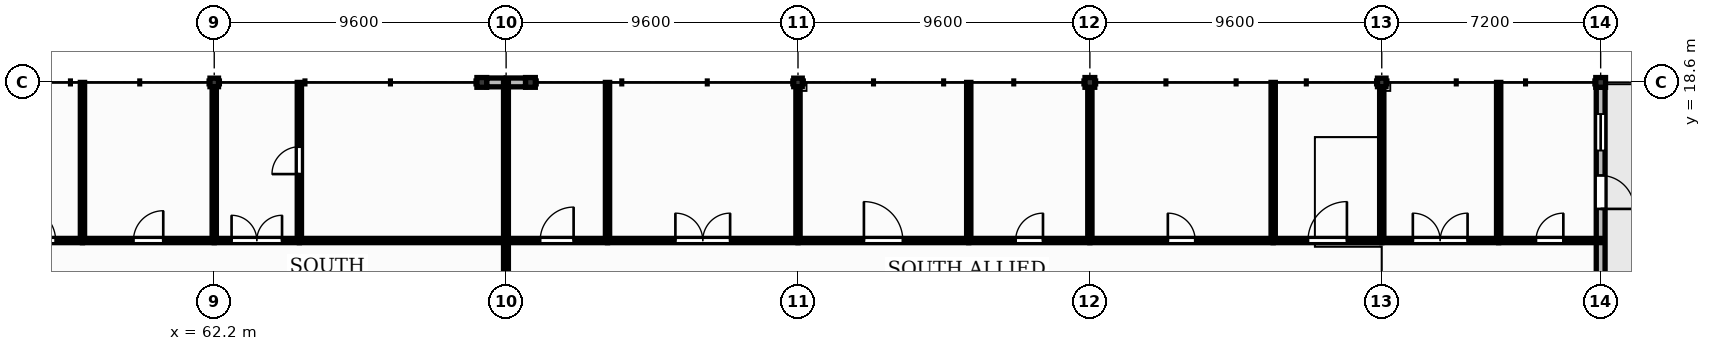
"""IFC4 building model, lengths in metres.
Left out: names, types, materials, properties, quantities, classifications, styles, units other than length and angle.
Written with IfcOpenShell. Run it as: python <this file> out.ifc"""

import sys

from ifc_helpers import new_model, si_unit, direction, frame, frame_2d, origin, origin_2d, place, context, subcontext, project, spatial, rectangle, extrude, element, fill, save


model = new_model("IFC4")
c1 = context("Model", 3, precision=1e-05, world=origin(), true_north=direction((0.0, 1.0)))
c2 = subcontext(c1, "Body", "Model", "MODEL_VIEW")
j1 = project(units=[si_unit("LENGTHUNIT", "METRE"), si_unit("PLANEANGLEUNIT", "RADIAN")], contexts=[c1])
p1 = place(None, origin())
s1 = spatial("IfcSite", under=j1, at=p1, CompositionType="ELEMENT")
p2 = place(p1, origin())
s2 = spatial("IfcBuilding", under=s1, at=p2, CompositionType="ELEMENT")
p3 = place(p2, frame((0.0, 0.0, 13.2)))
s3 = spatial("IfcBuildingStorey", under=s2, at=p3, CompositionType="ELEMENT", Elevation=13.2)
p4 = place(p3, frame((72.6, 18.6, 0.0), z_axis=(0.0, 0.0, 1.0), x_axis=(1.0, 0.0, 0.0)))
e1 = element("IfcColumn", 1, at=p4, inside=s3, PredefinedType="COLUMN", context=c2, shape_type="SweptSolid", body=[
    extrude(rectangle(XDim=0.32, YDim=0.32, at=origin_2d()), origin(), (0.0, 0.0, 1.0), 8.109),
])
p5 = place(p3, frame((81.4, 18.6, 0.0), z_axis=(0.0, 0.0, 1.0), x_axis=(1.0, 0.0, 0.0)))
e2 = element("IfcColumn", 2, at=p5, inside=s3, PredefinedType="COLUMN", context=c2, shape_type="SweptSolid", body=[
    extrude(rectangle(XDim=0.28, YDim=0.28, at=origin_2d()), origin(), (0.0, 0.0, 1.0), 8.109),
])
p6 = place(p3, frame((91.0, 18.6, 0.0), z_axis=(0.0, 0.0, 1.0), x_axis=(1.0, 0.0, 0.0)))
e3 = element("IfcColumn", 3, at=p6, inside=s3, PredefinedType="COLUMN", context=c2, shape_type="SweptSolid", body=[
    extrude(rectangle(XDim=0.32, YDim=0.32, at=origin_2d()), origin(), (0.0, 0.0, 1.0), 8.109),
])
p7 = place(p3, frame((100.6, 18.6, 0.0), z_axis=(0.0, 0.0, 1.0), x_axis=(1.0, 0.0, 0.0)))
e4 = element("IfcColumn", 4, at=p7, inside=s3, PredefinedType="COLUMN", context=c2, shape_type="SweptSolid", body=[
    extrude(rectangle(XDim=0.28, YDim=0.28, at=origin_2d()), origin(), (0.0, 0.0, 1.0), 8.109),
])
p8 = place(p3, frame((107.8, 18.6, 0.0), z_axis=(0.0, 0.0, 1.0), x_axis=(1.0, 0.0, 0.0)))
e5 = element("IfcColumn", 5, at=p8, inside=s3, PredefinedType="COLUMN", context=c2, shape_type="SweptSolid", body=[
    extrude(rectangle(XDim=0.32, YDim=0.32, at=origin_2d()), origin(), (0.0, 0.0, 1.0), 8.109),
])
p9 = place(p3, frame((62.2, 18.6, 0.0), z_axis=(0.0, 0.0, 1.0), x_axis=(1.0, 0.0, 0.0)))
e6 = element("IfcColumn", 6, at=p9, inside=s3, PredefinedType="COLUMN", context=c2, shape_type="SweptSolid", body=[
    extrude(rectangle(XDim=0.28, YDim=0.28, at=origin_2d()), origin(), (0.0, 0.0, 1.0), 8.109),
])
p10 = place(p3, frame((71.0, 18.6, 0.0), z_axis=(0.0, 0.0, 1.0), x_axis=(1.0, 0.0, 0.0)))
e7 = element("IfcColumn", 7, at=p10, inside=s3, PredefinedType="COLUMN", context=c2, shape_type="SweptSolid", body=[
    extrude(rectangle(XDim=0.32, YDim=0.32, at=origin_2d()), origin(), (0.0, 0.0, 1.0), 8.109),
])
p11 = place(p3, frame((71.16, 18.6, 0.0), z_axis=(0.0, 0.0, 1.0), x_axis=(1.0, 0.0, 0.0)))
e8 = element("IfcWall", 8, at=p11, inside=s3, PredefinedType="SOLIDWALL", context=c2, shape_type="SweptSolid", body=[
    extrude(rectangle(XDim=0.575, YDim=0.29, at=frame_2d((0.288, 0.0))), origin(), (0.0, 0.0, 1.0), 4.0),
])
p12 = place(p3, frame((71.805, 18.6, 0.0), z_axis=(0.0, 0.0, 1.0), x_axis=(1.0, 0.0, 0.0)))
e9 = element("IfcWall", 9, at=p12, inside=s3, PredefinedType="SOLIDWALL", context=c2, shape_type="SweptSolid", body=[
    extrude(rectangle(XDim=0.635, YDim=0.29, at=frame_2d((0.317, 0.0))), origin(), (0.0, 0.0, 1.0), 4.0),
])
p13 = place(p3, frame((107.8, 11.54, 0.0), z_axis=(0.0, 0.0, 1.0), x_axis=(0.0, 1.0, 0.0)))
e10 = element("IfcWall", 10, at=p13, inside=s3, PredefinedType="SOLIDWALL", context=c2, shape_type="SweptSolid", body=[
    extrude(rectangle(XDim=6.9, YDim=0.29, at=frame_2d((3.45, 0.0))), origin(), (0.0, 0.0, 1.0), 4.0),
])
p14 = place(p13, frame((2.9, 0.0, 0.0)))
e11 = element("IfcOpeningElement", 11, at=p14, cuts=e10, PredefinedType="OPENING", context=c2, shape_type="SweptSolid", body=[
    extrude(rectangle(XDim=1.1, YDim=2.25, at=frame_2d((0.55, 1.125))), frame((0.0, 0.155, 0.0), z_axis=(0.0, -1.0, 0.0), x_axis=(1.0, 0.0, 0.0)), (0.0, 0.0, 1.0), 0.31),
])
p15 = place(p13, frame((4.82, 0.0, 1.0)))
e12 = element("IfcOpeningElement", 12, at=p15, cuts=e10, PredefinedType="OPENING", context=c2, shape_type="SweptSolid", body=[
    extrude(rectangle(XDim=1.2, YDim=1.95, at=frame_2d((0.6, 0.975))), frame((0.0, 0.155, 0.0), z_axis=(0.0, -1.0, 0.0), x_axis=(1.0, 0.0, 0.0)), (0.0, 0.0, 1.0), 0.31),
])
p16 = place(p3, frame((55.0, 13.4, 0.0), z_axis=(0.0, 0.0, 1.0), x_axis=(1.0, 0.0, 0.0)))
e13 = element("IfcWall", 13, at=p16, inside=s3, PredefinedType="PARTITIONING", context=c2, shape_type="SweptSolid", body=[
    extrude(rectangle(XDim=2.866, YDim=0.14, at=frame_2d((1.433, 0.0))), origin(), (0.0, 0.0, 1.0), 3.75),
])
p17 = place(p16, frame((0.883, 0.0, 0.0)))
e14 = element("IfcOpeningElement", 14, at=p17, cuts=e13, PredefinedType="OPENING", context=c2, shape_type="SweptSolid", body=[
    extrude(rectangle(XDim=1.1, YDim=2.1, at=frame_2d((0.55, 1.05))), frame((0.0, 0.08, 0.0), z_axis=(0.0, -1.0, 0.0), x_axis=(1.0, 0.0, 0.0)), (0.0, 0.0, 1.0), 0.16),
])
p18 = place(p3, frame((57.866, 13.47, 0.0), z_axis=(0.0, 0.0, 1.0), x_axis=(0.0, 1.0, 0.0)))
e15 = element("IfcWall", 15, at=p18, inside=s3, PredefinedType="PARTITIONING", context=c2, shape_type="SweptSolid", body=[
    extrude(rectangle(XDim=5.13, YDim=0.14, at=frame_2d((2.565, 0.0))), origin(), (0.0, 0.0, 1.0), 3.75),
])
p19 = place(p3, frame((57.866, 13.4, 0.0), z_axis=(0.0, 0.0, 1.0), x_axis=(1.0, 0.0, 0.0)))
e16 = element("IfcWall", 16, at=p19, inside=s3, PredefinedType="PARTITIONING", context=c2, shape_type="SweptSolid", body=[
    extrude(rectangle(XDim=4.334, YDim=0.14, at=frame_2d((2.167, 0.0))), origin(), (0.0, 0.0, 1.0), 3.75),
])
p20 = place(p19, frame((1.677, 0.0, 0.0)))
e17 = element("IfcOpeningElement", 17, at=p20, cuts=e16, PredefinedType="OPENING", context=c2, shape_type="SweptSolid", body=[
    extrude(rectangle(XDim=0.98, YDim=2.15, at=frame_2d((0.49, 1.075))), frame((0.0, 0.08, 0.0), z_axis=(0.0, -1.0, 0.0), x_axis=(1.0, 0.0, 0.0)), (0.0, 0.0, 1.0), 0.16),
])
p21 = place(p3, frame((62.2, 13.47, 0.0), z_axis=(0.0, 0.0, 1.0), x_axis=(0.0, 1.0, 0.0)))
e18 = element("IfcWall", 18, at=p21, inside=s3, PredefinedType="PARTITIONING", context=c2, shape_type="SweptSolid", body=[
    extrude(rectangle(XDim=4.99, YDim=0.14, at=frame_2d((2.495, 0.0))), origin(), (0.0, 0.0, 1.0), 3.75),
])
p22 = place(p3, frame((62.2, 13.4, 0.0), z_axis=(0.0, 0.0, 1.0), x_axis=(1.0, 0.0, 0.0)))
e19 = element("IfcWall", 19, at=p22, inside=s3, PredefinedType="PARTITIONING", context=c2, shape_type="SweptSolid", body=[
    extrude(rectangle(XDim=2.8, YDim=0.14, at=frame_2d((1.4, 0.0))), origin(), (0.0, 0.0, 1.0), 3.75),
])
p23 = place(p22, frame((0.57, 0.0, 0.0)))
e20 = element("IfcOpeningElement", 20, at=p23, cuts=e19, PredefinedType="OPENING", context=c2, shape_type="SweptSolid", body=[
    extrude(rectangle(XDim=1.66, YDim=2.3, at=frame_2d((0.83, 1.15))), frame((0.0, 0.08, 0.0), z_axis=(0.0, -1.0, 0.0), x_axis=(1.0, 0.0, 0.0)), (0.0, 0.0, 1.0), 0.16),
])
p24 = place(p3, frame((65.0, 13.47, 0.0), z_axis=(0.0, 0.0, 1.0), x_axis=(0.0, 1.0, 0.0)))
e21 = element("IfcWall", 21, at=p24, inside=s3, PredefinedType="PARTITIONING", context=c2, shape_type="SweptSolid", body=[
    extrude(rectangle(XDim=5.13, YDim=0.14, at=frame_2d((2.565, 0.0))), origin(), (0.0, 0.0, 1.0), 3.75),
])
p25 = place(p24, frame((2.115, 0.0, 0.0)))
e22 = element("IfcOpeningElement", 22, at=p25, cuts=e21, PredefinedType="OPENING", context=c2, shape_type="SweptSolid", body=[
    extrude(rectangle(XDim=0.9, YDim=2.1, at=frame_2d((0.45, 1.05))), frame((0.0, 0.08, 0.0), z_axis=(0.0, -1.0, 0.0), x_axis=(1.0, 0.0, 0.0)), (0.0, 0.0, 1.0), 0.16),
])
p26 = place(p3, frame((65.0, 13.4, 0.0), z_axis=(0.0, 0.0, 1.0), x_axis=(1.0, 0.0, 0.0)))
e23 = element("IfcWall", 23, at=p26, inside=s3, PredefinedType="PARTITIONING", context=c2, shape_type="SweptSolid", body=[
    extrude(rectangle(XDim=6.795, YDim=0.14, at=frame_2d((3.397, 0.0))), origin(), (0.0, 0.0, 1.0), 3.75),
])
p27 = place(p3, frame((71.805, 13.4, 0.0), z_axis=(0.0, 0.0, 1.0), x_axis=(1.0, 0.0, 0.0)))
e24 = element("IfcWall", 24, at=p27, inside=s3, PredefinedType="PARTITIONING", context=c2, shape_type="SweptSolid", body=[
    extrude(rectangle(XDim=3.33, YDim=0.14, at=frame_2d((1.665, 0.0))), origin(), (0.0, 0.0, 1.0), 3.75),
])
p28 = place(p27, frame((1.115, 0.0, 0.0)))
e25 = element("IfcOpeningElement", 25, at=p28, cuts=e24, PredefinedType="OPENING", context=c2, shape_type="SweptSolid", body=[
    extrude(rectangle(XDim=1.1, YDim=2.1, at=frame_2d((0.55, 1.05))), frame((0.0, 0.08, 0.0), z_axis=(0.0, -1.0, 0.0), x_axis=(1.0, 0.0, 0.0)), (0.0, 0.0, 1.0), 0.16),
])
p29 = place(p3, frame((75.135, 13.47, 0.0), z_axis=(0.0, 0.0, 1.0), x_axis=(0.0, 1.0, 0.0)))
e26 = element("IfcWall", 26, at=p29, inside=s3, PredefinedType="PARTITIONING", context=c2, shape_type="SweptSolid", body=[
    extrude(rectangle(XDim=5.13, YDim=0.14, at=frame_2d((2.565, 0.0))), origin(), (0.0, 0.0, 1.0), 3.75),
])
p30 = place(p3, frame((75.135, 13.4, 0.0), z_axis=(0.0, 0.0, 1.0), x_axis=(1.0, 0.0, 0.0)))
e27 = element("IfcWall", 27, at=p30, inside=s3, PredefinedType="PARTITIONING", context=c2, shape_type="SweptSolid", body=[
    extrude(rectangle(XDim=6.265, YDim=0.14, at=frame_2d((3.132, 0.0))), origin(), (0.0, 0.0, 1.0), 3.75),
])
p31 = place(p30, frame((2.232, 0.0, 0.0)))
e28 = element("IfcOpeningElement", 28, at=p31, cuts=e27, PredefinedType="OPENING", context=c2, shape_type="SweptSolid", body=[
    extrude(rectangle(XDim=1.8, YDim=2.3, at=frame_2d((0.9, 1.15))), frame((0.0, 0.08, 0.0), z_axis=(0.0, -1.0, 0.0), x_axis=(1.0, 0.0, 0.0)), (0.0, 0.0, 1.0), 0.16),
])
p32 = place(p3, frame((81.4, 13.47, 0.0), z_axis=(0.0, 0.0, 1.0), x_axis=(0.0, 1.0, 0.0)))
e29 = element("IfcWall", 29, at=p32, inside=s3, PredefinedType="PARTITIONING", context=c2, shape_type="SweptSolid", body=[
    extrude(rectangle(XDim=4.99, YDim=0.14, at=frame_2d((2.495, 0.0))), origin(), (0.0, 0.0, 1.0), 3.75),
])
p33 = place(p3, frame((81.4, 13.4, 0.0), z_axis=(0.0, 0.0, 1.0), x_axis=(1.0, 0.0, 0.0)))
e30 = element("IfcWall", 30, at=p33, inside=s3, PredefinedType="PARTITIONING", context=c2, shape_type="SweptSolid", body=[
    extrude(rectangle(XDim=5.616, YDim=0.14, at=frame_2d((2.808, 0.0))), origin(), (0.0, 0.0, 1.0), 3.75),
])
p34 = place(p33, frame((2.168, 0.0, 0.0)))
e31 = element("IfcOpeningElement", 31, at=p34, cuts=e30, PredefinedType="OPENING", context=c2, shape_type="SweptSolid", body=[
    extrude(rectangle(XDim=1.28, YDim=2.2, at=frame_2d((0.64, 1.1))), frame((0.0, 0.08, 0.0), z_axis=(0.0, -1.0, 0.0), x_axis=(1.0, 0.0, 0.0)), (0.0, 0.0, 1.0), 0.16),
])
p35 = place(p3, frame((87.016, 13.47, 0.0), z_axis=(0.0, 0.0, 1.0), x_axis=(0.0, 1.0, 0.0)))
e32 = element("IfcWall", 32, at=p35, inside=s3, PredefinedType="PARTITIONING", context=c2, shape_type="SweptSolid", body=[
    extrude(rectangle(XDim=5.13, YDim=0.14, at=frame_2d((2.565, 0.0))), origin(), (0.0, 0.0, 1.0), 3.75),
])
p36 = place(p3, frame((87.016, 13.4, 0.0), z_axis=(0.0, 0.0, 1.0), x_axis=(1.0, 0.0, 0.0)))
e33 = element("IfcWall", 33, at=p36, inside=s3, PredefinedType="PARTITIONING", context=c2, shape_type="SweptSolid", body=[
    extrude(rectangle(XDim=3.984, YDim=0.14, at=frame_2d((1.992, 0.0))), origin(), (0.0, 0.0, 1.0), 3.75),
])
p37 = place(p36, frame((1.542, 0.0, 0.0)))
e34 = element("IfcOpeningElement", 34, at=p37, cuts=e33, PredefinedType="OPENING", context=c2, shape_type="SweptSolid", body=[
    extrude(rectangle(XDim=0.9, YDim=2.1, at=frame_2d((0.45, 1.05))), frame((0.0, 0.08, 0.0), z_axis=(0.0, -1.0, 0.0), x_axis=(1.0, 0.0, 0.0)), (0.0, 0.0, 1.0), 0.16),
])
p38 = place(p3, frame((91.0, 13.47, 0.0), z_axis=(0.0, 0.0, 1.0), x_axis=(0.0, 1.0, 0.0)))
e35 = element("IfcWall", 35, at=p38, inside=s3, PredefinedType="PARTITIONING", context=c2, shape_type="SweptSolid", body=[
    extrude(rectangle(XDim=4.97, YDim=0.14, at=frame_2d((2.485, 0.0))), origin(), (0.0, 0.0, 1.0), 3.75),
])
p39 = place(p3, frame((91.0, 13.4, 0.0), z_axis=(0.0, 0.0, 1.0), x_axis=(1.0, 0.0, 0.0)))
e36 = element("IfcWall", 36, at=p39, inside=s3, PredefinedType="PARTITIONING", context=c2, shape_type="SweptSolid", body=[
    extrude(rectangle(XDim=6.029, YDim=0.14, at=frame_2d((3.015, 0.0))), origin(), (0.0, 0.0, 1.0), 3.75),
])
p40 = place(p39, frame((2.564, 0.0, 0.0)))
e37 = element("IfcOpeningElement", 37, at=p40, cuts=e36, PredefinedType="OPENING", context=c2, shape_type="SweptSolid", body=[
    extrude(rectangle(XDim=0.9, YDim=2.1, at=frame_2d((0.45, 1.05))), frame((0.0, 0.08, 0.0), z_axis=(0.0, -1.0, 0.0), x_axis=(1.0, 0.0, 0.0)), (0.0, 0.0, 1.0), 0.16),
])
p41 = place(p3, frame((97.029, 13.47, 0.0), z_axis=(0.0, 0.0, 1.0), x_axis=(0.0, 1.0, 0.0)))
e38 = element("IfcWall", 38, at=p41, inside=s3, PredefinedType="PARTITIONING", context=c2, shape_type="SweptSolid", body=[
    extrude(rectangle(XDim=5.13, YDim=0.14, at=frame_2d((2.565, 0.0))), origin(), (0.0, 0.0, 1.0), 3.75),
])
p42 = place(p3, frame((97.029, 13.4, 0.0), z_axis=(0.0, 0.0, 1.0), x_axis=(1.0, 0.0, 0.0)))
e39 = element("IfcWall", 39, at=p42, inside=s3, PredefinedType="PARTITIONING", context=c2, shape_type="SweptSolid", body=[
    extrude(rectangle(XDim=3.571, YDim=0.14, at=frame_2d((1.786, 0.0))), origin(), (0.0, 0.0, 1.0), 3.75),
])
p43 = place(p42, frame((1.146, 0.0, 0.0)))
e40 = element("IfcOpeningElement", 40, at=p43, cuts=e39, PredefinedType="OPENING", context=c2, shape_type="SweptSolid", body=[
    extrude(rectangle(XDim=1.28, YDim=2.2, at=frame_2d((0.64, 1.1))), frame((0.0, 0.08, 0.0), z_axis=(0.0, -1.0, 0.0), x_axis=(1.0, 0.0, 0.0)), (0.0, 0.0, 1.0), 0.16),
])
p44 = place(p3, frame((100.6, 13.47, 0.0), z_axis=(0.0, 0.0, 1.0), x_axis=(0.0, 1.0, 0.0)))
e41 = element("IfcWall", 41, at=p44, inside=s3, PredefinedType="PARTITIONING", context=c2, shape_type="SweptSolid", body=[
    extrude(rectangle(XDim=4.99, YDim=0.14, at=frame_2d((2.495, 0.0))), origin(), (0.0, 0.0, 1.0), 3.75),
])
p45 = place(p3, frame((100.6, 13.4, 0.0), z_axis=(0.0, 0.0, 1.0), x_axis=(1.0, 0.0, 0.0)))
e42 = element("IfcWall", 42, at=p45, inside=s3, PredefinedType="PARTITIONING", context=c2, shape_type="SweptSolid", body=[
    extrude(rectangle(XDim=3.845, YDim=0.14, at=frame_2d((1.922, 0.0))), origin(), (0.0, 0.0, 1.0), 3.75),
])
p46 = place(p45, frame((1.022, 0.0, 0.0)))
e43 = element("IfcOpeningElement", 43, at=p46, cuts=e42, PredefinedType="OPENING", context=c2, shape_type="SweptSolid", body=[
    extrude(rectangle(XDim=1.8, YDim=2.3, at=frame_2d((0.9, 1.15))), frame((0.0, 0.08, 0.0), z_axis=(0.0, -1.0, 0.0), x_axis=(1.0, 0.0, 0.0)), (0.0, 0.0, 1.0), 0.16),
])
p47 = place(p3, frame((104.445, 13.47, 0.0), z_axis=(0.0, 0.0, 1.0), x_axis=(0.0, 1.0, 0.0)))
e44 = element("IfcWall", 44, at=p47, inside=s3, PredefinedType="PARTITIONING", context=c2, shape_type="SweptSolid", body=[
    extrude(rectangle(XDim=5.13, YDim=0.14, at=frame_2d((2.565, 0.0))), origin(), (0.0, 0.0, 1.0), 3.75),
])
p48 = place(p3, frame((104.445, 13.4, 0.0), z_axis=(0.0, 0.0, 1.0), x_axis=(1.0, 0.0, 0.0)))
e45 = element("IfcWall", 45, at=p48, inside=s3, PredefinedType="PARTITIONING", context=c2, shape_type="SweptSolid", body=[
    extrude(rectangle(XDim=3.355, YDim=0.14, at=frame_2d((1.677, 0.0))), origin(), (0.0, 0.0, 1.0), 3.75),
])
p49 = place(p48, frame((1.228, 0.0, 0.0)))
e46 = element("IfcOpeningElement", 46, at=p49, cuts=e45, PredefinedType="OPENING", context=c2, shape_type="SweptSolid", body=[
    extrude(rectangle(XDim=0.9, YDim=2.1, at=frame_2d((0.45, 1.05))), frame((0.0, 0.08, 0.0), z_axis=(0.0, -1.0, 0.0), x_axis=(1.0, 0.0, 0.0)), (0.0, 0.0, 1.0), 0.16),
])
p50 = place(p3, frame((71.795, 10.87, 0.0), z_axis=(0.0, 0.0, 1.0), x_axis=(0.0, 1.0, 0.0)))
e47 = element("IfcWall", 47, at=p50, inside=s3, PredefinedType="PARTITIONING", context=c2, shape_type="SweptSolid", body=[
    extrude(rectangle(XDim=2.46, YDim=0.16, at=frame_2d((1.23, 0.0))), origin(), (0.0, 0.0, 1.0), 3.75),
])
p51 = place(p3, frame((71.795, 13.47, 0.0), z_axis=(0.0, 0.0, 1.0), x_axis=(0.0, 1.0, 0.0)))
e48 = element("IfcWall", 48, at=p51, inside=s3, PredefinedType="PARTITIONING", context=c2, shape_type="SweptSolid", body=[
    extrude(rectangle(XDim=5.13, YDim=0.16, at=frame_2d((2.565, 0.0))), origin(), (0.0, 0.0, 1.0), 3.75),
])
p52 = place(p14, frame((1.1, 0.0, 0.0), z_axis=(0.0, 0.0, 1.0), x_axis=(-1.0, 0.0, 0.0)))
e49 = element("IfcDoor", 49, at=p52, inside=s3, OperationType="SINGLE_SWING_RIGHT", PredefinedType="DOOR", context=c2, shape_type="SweptSolid", body=[
    extrude(rectangle(XDim=1.1, YDim=2.25, at=frame_2d((0.55, 1.125))), frame((0.0, 0.025, 0.0), z_axis=(0.0, -1.0, 0.0), x_axis=(1.0, 0.0, 0.0)), (0.0, 0.0, 1.0), 0.05),
])
fill(e11, e49)
p53 = place(p15, origin())
e50 = element("IfcWindow", 50, at=p53, inside=s3, PartitioningType="SINGLE_PANEL", PredefinedType="WINDOW", context=c2, shape_type="SweptSolid", body=[
    extrude(rectangle(XDim=1.2, YDim=1.95, at=frame_2d((0.6, 0.975))), frame((0.0, 0.03, 0.0), z_axis=(0.0, -1.0, 0.0), x_axis=(1.0, 0.0, 0.0)), (0.0, 0.0, 1.0), 0.06),
])
fill(e12, e50)
p54 = place(p23, origin())
e51 = element("IfcDoor", 51, at=p54, inside=s3, OperationType="DOUBLE_DOOR_SINGLE_SWING", PredefinedType="DOOR", context=c2, shape_type="SweptSolid", body=[
    extrude(rectangle(XDim=1.66, YDim=2.3, at=frame_2d((0.83, 1.15))), frame((0.0, 0.025, 0.0), z_axis=(0.0, -1.0, 0.0), x_axis=(1.0, 0.0, 0.0)), (0.0, 0.0, 1.0), 0.05),
])
fill(e20, e51)
p55 = place(p17, origin())
e52 = element("IfcDoor", 52, at=p55, inside=s3, OperationType="SINGLE_SWING_LEFT", PredefinedType="DOOR", context=c2, shape_type="SweptSolid", body=[
    extrude(rectangle(XDim=1.1, YDim=2.1, at=frame_2d((0.55, 1.05))), frame((0.0, 0.025, 0.0), z_axis=(0.0, -1.0, 0.0), x_axis=(1.0, 0.0, 0.0)), (0.0, 0.0, 1.0), 0.05),
])
fill(e14, e52)
p56 = place(p20, origin())
e53 = element("IfcDoor", 53, at=p56, inside=s3, OperationType="SINGLE_SWING_RIGHT", PredefinedType="DOOR", context=c2, shape_type="SweptSolid", body=[
    extrude(rectangle(XDim=0.98, YDim=2.15, at=frame_2d((0.49, 1.075))), frame((0.0, 0.025, 0.0), z_axis=(0.0, -1.0, 0.0), x_axis=(1.0, 0.0, 0.0)), (0.0, 0.0, 1.0), 0.05),
])
fill(e17, e53)
p57 = place(p25, origin())
e54 = element("IfcDoor", 54, at=p57, inside=s3, OperationType="SINGLE_SWING_LEFT", PredefinedType="DOOR", context=c2, shape_type="SweptSolid", body=[
    extrude(rectangle(XDim=0.9, YDim=2.1, at=frame_2d((0.45, 1.05))), frame((0.0, 0.025, 0.0), z_axis=(0.0, -1.0, 0.0), x_axis=(1.0, 0.0, 0.0)), (0.0, 0.0, 1.0), 0.05),
])
fill(e22, e54)
p58 = place(p28, origin())
e55 = element("IfcDoor", 55, at=p58, inside=s3, OperationType="SINGLE_SWING_RIGHT", PredefinedType="DOOR", context=c2, shape_type="SweptSolid", body=[
    extrude(rectangle(XDim=1.1, YDim=2.1, at=frame_2d((0.55, 1.05))), frame((0.0, 0.025, 0.0), z_axis=(0.0, -1.0, 0.0), x_axis=(1.0, 0.0, 0.0)), (0.0, 0.0, 1.0), 0.05),
])
fill(e25, e55)
p59 = place(p31, origin())
e56 = element("IfcDoor", 56, at=p59, inside=s3, OperationType="DOUBLE_DOOR_SINGLE_SWING", PredefinedType="DOOR", context=c2, shape_type="SweptSolid", body=[
    extrude(rectangle(XDim=1.8, YDim=2.3, at=frame_2d((0.9, 1.15))), frame((0.0, 0.025, 0.0), z_axis=(0.0, -1.0, 0.0), x_axis=(1.0, 0.0, 0.0)), (0.0, 0.0, 1.0), 0.05),
])
fill(e28, e56)
p60 = place(p34, origin())
e57 = element("IfcDoor", 57, at=p60, inside=s3, OperationType="SINGLE_SWING_LEFT", PredefinedType="DOOR", context=c2, shape_type="SweptSolid", body=[
    extrude(rectangle(XDim=1.28, YDim=2.2, at=frame_2d((0.64, 1.1))), frame((0.0, 0.025, 0.0), z_axis=(0.0, -1.0, 0.0), x_axis=(1.0, 0.0, 0.0)), (0.0, 0.0, 1.0), 0.05),
])
fill(e31, e57)
p61 = place(p37, origin())
e58 = element("IfcDoor", 58, at=p61, inside=s3, OperationType="SINGLE_SWING_RIGHT", PredefinedType="DOOR", context=c2, shape_type="SweptSolid", body=[
    extrude(rectangle(XDim=0.9, YDim=2.1, at=frame_2d((0.45, 1.05))), frame((0.0, 0.025, 0.0), z_axis=(0.0, -1.0, 0.0), x_axis=(1.0, 0.0, 0.0)), (0.0, 0.0, 1.0), 0.05),
])
fill(e34, e58)
p62 = place(p40, origin())
e59 = element("IfcDoor", 59, at=p62, inside=s3, OperationType="SINGLE_SWING_LEFT", PredefinedType="DOOR", context=c2, shape_type="SweptSolid", body=[
    extrude(rectangle(XDim=0.9, YDim=2.1, at=frame_2d((0.45, 1.05))), frame((0.0, 0.025, 0.0), z_axis=(0.0, -1.0, 0.0), x_axis=(1.0, 0.0, 0.0)), (0.0, 0.0, 1.0), 0.05),
])
fill(e37, e59)
p63 = place(p43, origin())
e60 = element("IfcDoor", 60, at=p63, inside=s3, OperationType="SINGLE_SWING_RIGHT", PredefinedType="DOOR", context=c2, shape_type="SweptSolid", body=[
    extrude(rectangle(XDim=1.28, YDim=2.2, at=frame_2d((0.64, 1.1))), frame((0.0, 0.025, 0.0), z_axis=(0.0, -1.0, 0.0), x_axis=(1.0, 0.0, 0.0)), (0.0, 0.0, 1.0), 0.05),
])
fill(e40, e60)
p64 = place(p46, origin())
e61 = element("IfcDoor", 61, at=p64, inside=s3, OperationType="DOUBLE_DOOR_SINGLE_SWING", PredefinedType="DOOR", context=c2, shape_type="SweptSolid", body=[
    extrude(rectangle(XDim=1.8, YDim=2.3, at=frame_2d((0.9, 1.15))), frame((0.0, 0.025, 0.0), z_axis=(0.0, -1.0, 0.0), x_axis=(1.0, 0.0, 0.0)), (0.0, 0.0, 1.0), 0.05),
])
fill(e43, e61)
p65 = place(p49, origin())
e62 = element("IfcDoor", 62, at=p65, inside=s3, OperationType="SINGLE_SWING_RIGHT", PredefinedType="DOOR", context=c2, shape_type="SweptSolid", body=[
    extrude(rectangle(XDim=0.9, YDim=2.1, at=frame_2d((0.45, 1.05))), frame((0.0, 0.025, 0.0), z_axis=(0.0, -1.0, 0.0), x_axis=(1.0, 0.0, 0.0)), (0.0, 0.0, 1.0), 0.05),
])
fill(e46, e62)
save(model, sys.argv[1])
